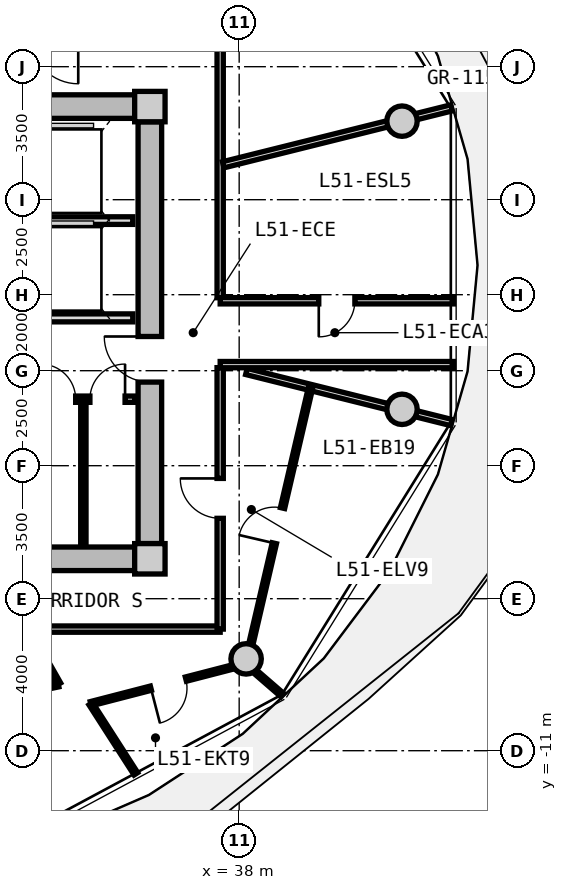
"""IFC4 building model, lengths in metres.
Left out: names, types, materials, properties, quantities, classifications, styles, units other than length and angle.
Written with IfcOpenShell. Run it as: python <this file> out.ifc"""

import sys

from ifc_helpers import new_model, si_unit, direction, frame, frame_2d, origin, origin_2d, place, context, subcontext, project, spatial, rectangle, circle, extrude, source, transform, mapped, element, fill, save


model = new_model("IFC4")
c1 = context("Model", 3, precision=1e-05, world=origin(), true_north=direction((0.0, 1.0)))
c2 = subcontext(c1, "Body", "Model", "MODEL_VIEW")
j1 = project(units=[si_unit("LENGTHUNIT", "METRE"), si_unit("PLANEANGLEUNIT", "RADIAN")], contexts=[c1])
p1 = place(None, origin())
s1 = spatial("IfcSite", under=j1, at=p1, CompositionType="ELEMENT")
p2 = place(p1, origin())
s2 = spatial("IfcBuilding", under=s1, at=p2, CompositionType="ELEMENT")
p3 = place(p2, frame((0.0, 0.0, 164.8)))
s3 = spatial("IfcBuildingStorey", under=s2, at=p3, CompositionType="ELEMENT", Elevation=164.8)
m1 = source(origin(), c2, "Body", "SweptSolid", [
    extrude(rectangle(XDim=0.8, YDim=0.8, at=origin_2d()), origin(), (0.0, 0.0, 1.0), 3.05),
])
for number, where, z_axis, x_axis in (
    (1, (35.65, -5.95, 0.0), (0.0, 0.0, 1.0), (1.0, 0.0, 0.0)),
    (2, (35.65, 5.95, 0.0), (0.0, 0.0, 1.0), (1.0, 0.0, 0.0)),
):
    element("IfcColumn", number, at=place(p3, frame(where, z_axis=z_axis, x_axis=x_axis)), inside=s3, PredefinedType="COLUMN", context=c2, shape_type="MappedRepresentation", body=[
        mapped(m1, transform((0.0, 0.0, 0.0), x_axis=(1.0, 0.0, 0.0), y_axis=(0.0, 1.0, 0.0), z_axis=(0.0, 0.0, 1.0), scale=1.0)),
    ])
m2 = source(origin(), c2, "Body", "SweptSolid", [
    extrude(rectangle(XDim=14.5, YDim=0.62, at=frame_2d((7.25, 0.0))), origin(), (0.0, 0.0, 1.0), 2.81),
])
for number, where, z_axis, x_axis in (
    (3, (20.75, 5.95, 0.0), (0.0, 0.0, 1.0), (1.0, 0.0, 0.0)),
    (4, (35.25, -5.95, 0.0), (0.0, 0.0, 1.0), (-1.0, 0.0, 0.0)),
):
    element("IfcWall", number, at=place(p3, frame(where, z_axis=z_axis, x_axis=x_axis)), inside=s3, PredefinedType="SHEAR", context=c2, shape_type="MappedRepresentation", body=[
        mapped(m2, transform((0.0, 0.0, 0.0), x_axis=(1.0, 0.0, 0.0), y_axis=(0.0, 1.0, 0.0), z_axis=(0.0, 0.0, 1.0), scale=1.0)),
    ])
m3 = source(origin(), c2, "Body", "SweptSolid", [
    extrude(rectangle(XDim=11.1, YDim=0.62, at=frame_2d((5.55, 0.0))), origin(), (0.0, 0.0, 1.0), 2.81),
])
p4 = place(p3, frame((35.65, 5.55, 0.0), z_axis=(0.0, 0.0, 1.0), x_axis=(0.0, -1.0, 0.0)))
e5 = element("IfcWall", 5, at=p4, inside=s3, PredefinedType="SHEAR", context=c2, shape_type="MappedRepresentation", body=[
    mapped(m3, transform((0.0, 0.0, 0.0), x_axis=(1.0, 0.0, 0.0), y_axis=(0.0, 1.0, 0.0), z_axis=(0.0, 0.0, 1.0), scale=1.0)),
])
p5 = place(p4, frame((5.65, 0.0, 0.0)))
e6 = element("IfcOpeningElement", 6, at=p5, cuts=e5, PredefinedType="OPENING", context=c2, shape_type="SweptSolid", body=[
    extrude(rectangle(XDim=1.2, YDim=2.15, at=frame_2d((0.6, 1.075))), frame((0.0, 0.32, 0.0), z_axis=(0.0, -1.0, 0.0), x_axis=(1.0, 0.0, 0.0)), (0.0, 0.0, 1.0), 0.64),
])
m4 = source(origin(), c2, "Body", "SweptSolid", [
    extrude(circle(Radius=0.4, at=origin_2d()), origin(), (0.0, 0.0, 1.0), 3.05),
])
for number, where, z_axis, x_axis in (
    (7, (42.285, 5.567, 0.0), (0.0, 0.0, 1.0), (1.0, 0.0, 0.0)),
    (8, (38.183, -8.584, 0.0), (0.0, 0.0, 1.0), (1.0, 0.0, 0.0)),
    (9, (42.285, -2.016, 0.0), (0.0, 0.0, 1.0), (1.0, 0.0, 0.0)),
):
    element("IfcColumn", number, at=place(p3, frame(where, z_axis=z_axis, x_axis=x_axis)), inside=s3, PredefinedType="COLUMN", context=c2, shape_type="MappedRepresentation", body=[
        mapped(m4, transform((0.0, 0.0, 0.0), x_axis=(1.0, 0.0, 0.0), y_axis=(0.0, 1.0, 0.0), z_axis=(0.0, 0.0, 1.0), scale=1.0)),
    ])
m5 = source(origin(), c2, "Body", "SweptSolid", [
    extrude(rectangle(XDim=3.2, YDim=0.2, at=frame_2d((1.6, 0.0))), origin(), (0.0, 0.0, 1.0), 2.795),
])
p6 = place(p3, frame((32.0, 2.95, 0.0), z_axis=(0.0, 0.0, 1.0), x_axis=(1.0, 0.0, 0.0)))
e10 = element("IfcWall", 10, at=p6, inside=s3, PredefinedType="PARTITIONING", context=c2, shape_type="MappedRepresentation", body=[
    mapped(m5, transform((0.0, 0.0, 0.0), x_axis=(1.0, 0.0, 0.0), y_axis=(0.0, 1.0, 0.0), z_axis=(0.0, 0.0, 1.0), scale=1.0)),
])
m6 = source(origin(), c2, "Body", "SweptSolid", [
    extrude(rectangle(XDim=6.66, YDim=0.21, at=frame_2d((3.33, 0.0))), origin(), (0.0, 0.0, 1.0), 2.795),
])
p7 = place(p3, frame((28.54, 0.39, 0.0), z_axis=(0.0, 0.0, 1.0), x_axis=(1.0, 0.0, 0.0)))
e11 = element("IfcWall", 11, at=p7, inside=s3, PredefinedType="PARTITIONING", context=c2, shape_type="MappedRepresentation", body=[
    mapped(m6, transform((0.0, 0.0, 0.0), x_axis=(1.0, 0.0, 0.0), y_axis=(0.0, 1.0, 0.0), z_axis=(0.0, 0.0, 1.0), scale=1.0)),
])
p8 = place(p7, frame((1.0, 0.0, 0.0)))
e12 = element("IfcOpeningElement", 12, at=p8, cuts=e11, PredefinedType="OPENING", context=c2, shape_type="SweptSolid", body=[
    extrude(rectangle(XDim=1.2, YDim=2.15, at=frame_2d((0.6, 1.075))), frame((0.0, 0.115, 0.0), z_axis=(0.0, -1.0, 0.0), x_axis=(1.0, 0.0, 0.0)), (0.0, 0.0, 1.0), 0.23),
])
m7 = source(origin(), c2, "Body", "SweptSolid", [
    extrude(rectangle(XDim=2.7, YDim=0.165, at=frame_2d((1.35, 0.0))), origin(), (0.0, 0.0, 1.0), 2.795),
])
p9 = place(p3, frame((32.55, -1.75, 0.0), z_axis=(0.0, 0.0, 1.0), x_axis=(1.0, 0.0, 0.0)))
e13 = element("IfcWall", 13, at=p9, inside=s3, PredefinedType="PARTITIONING", context=c2, shape_type="MappedRepresentation", body=[
    mapped(m7, transform((0.0, 0.0, 0.0), x_axis=(1.0, 0.0, 0.0), y_axis=(0.0, 1.0, 0.0), z_axis=(0.0, 0.0, 1.0), scale=1.0)),
])
p10 = place(p9, frame((0.222, 0.0, 0.0)))
e14 = element("IfcOpeningElement", 14, at=p10, cuts=e13, PredefinedType="OPENING", context=c2, shape_type="SweptSolid", body=[
    extrude(rectangle(XDim=0.925, YDim=2.1, at=frame_2d((0.462, 1.05))), frame((0.0, 0.093, 0.0), z_axis=(0.0, -1.0, 0.0), x_axis=(1.0, 0.0, 0.0)), (0.0, 0.0, 1.0), 0.185),
])
p11 = place(p9, frame((1.522, 0.0, 0.0)))
e15 = element("IfcOpeningElement", 15, at=p11, cuts=e13, PredefinedType="OPENING", context=c2, shape_type="SweptSolid", body=[
    extrude(rectangle(XDim=0.925, YDim=2.1, at=frame_2d((0.462, 1.05))), frame((0.0, 0.093, 0.0), z_axis=(0.0, -1.0, 0.0), x_axis=(1.0, 0.0, 0.0)), (0.0, 0.0, 1.0), 0.185),
])
m8 = source(origin(), c2, "Body", "SweptSolid", [
    extrude(rectangle(XDim=3.8, YDim=0.14, at=frame_2d((1.9, 0.0))), origin(), (0.0, 0.0, 1.0), 2.795),
])
p12 = place(p3, frame((33.9, -5.55, 0.0), z_axis=(0.0, 0.0, 1.0), x_axis=(0.0, 1.0, 0.0)))
e16 = element("IfcWall", 16, at=p12, inside=s3, PredefinedType="PARTITIONING", context=c2, shape_type="MappedRepresentation", body=[
    mapped(m8, transform((0.0, 0.0, 0.0), x_axis=(1.0, 0.0, 0.0), y_axis=(0.0, 1.0, 0.0), z_axis=(0.0, 0.0, 1.0), scale=1.0)),
])
m9 = source(origin(), c2, "Body", "SweptSolid", [
    extrude(rectangle(XDim=19.0, YDim=0.165, at=frame_2d((9.5, 0.0))), origin(), (0.0, 0.0, 1.0), 2.795),
])
p13 = place(p3, frame((37.5, -7.8, 0.0), z_axis=(0.0, 0.0, 1.0), x_axis=(-1.0, 0.0, 0.0)))
e17 = element("IfcWall", 17, at=p13, inside=s3, PredefinedType="PARTITIONING", context=c2, shape_type="MappedRepresentation", body=[
    mapped(m9, transform((0.0, 0.0, 0.0), x_axis=(1.0, 0.0, 0.0), y_axis=(0.0, 1.0, 0.0), z_axis=(0.0, 0.0, 1.0), scale=1.0)),
])
p14 = place(p13, frame((12.623, 0.0, 0.0)))
e18 = element("IfcOpeningElement", 18, at=p14, cuts=e17, PredefinedType="OPENING", context=c2, shape_type="SweptSolid", body=[
    extrude(rectangle(XDim=1.25, YDim=2.2, at=frame_2d((0.625, 1.1))), frame((0.0, 0.093, 0.0), z_axis=(0.0, -1.0, 0.0), x_axis=(1.0, 0.0, 0.0)), (0.0, 0.0, 1.0), 0.185),
])
m10 = source(origin(), c2, "Body", "SweptSolid", [
    extrude(rectangle(XDim=6.88, YDim=0.165, at=frame_2d((3.44, 0.0))), origin(), (0.0, 0.0, 1.0), 2.795),
])
p15 = place(p3, frame((37.5, 7.8, 0.0), z_axis=(0.0, 0.0, 1.0), x_axis=(0.0, -1.0, 0.0)))
e19 = element("IfcWall", 19, at=p15, inside=s3, PredefinedType="PARTITIONING", context=c2, shape_type="MappedRepresentation", body=[
    mapped(m10, transform((0.0, 0.0, 0.0), x_axis=(1.0, 0.0, 0.0), y_axis=(0.0, 1.0, 0.0), z_axis=(0.0, 0.0, 1.0), scale=1.0)),
])
p16 = place(p3, frame((37.5, -0.92, 0.0), z_axis=(0.0, 0.0, 1.0), x_axis=(0.0, -1.0, 0.0)))
e20 = element("IfcWall", 20, at=p16, inside=s3, PredefinedType="PARTITIONING", context=c2, shape_type="MappedRepresentation", body=[
    mapped(m10, transform((0.0, 0.0, 0.0), x_axis=(1.0, 0.0, 0.0), y_axis=(0.0, 1.0, 0.0), z_axis=(0.0, 0.0, 1.0), scale=1.0)),
])
p17 = place(p16, frame((2.915, 0.0, 0.0)))
e21 = element("IfcOpeningElement", 21, at=p17, cuts=e20, PredefinedType="OPENING", context=c2, shape_type="SweptSolid", body=[
    extrude(rectangle(XDim=1.05, YDim=2.15, at=frame_2d((0.525, 1.075))), frame((0.0, 0.093, 0.0), z_axis=(0.0, -1.0, 0.0), x_axis=(1.0, 0.0, 0.0)), (0.0, 0.0, 1.0), 0.185),
])
m11 = source(origin(), c2, "Body", "SweptSolid", [
    extrude(rectangle(XDim=5.564, YDim=0.165, at=frame_2d((2.782, 0.0))), origin(), (0.0, 0.0, 1.0), 2.345),
])
p18 = place(p3, frame((38.19, -1.02, 0.0), z_axis=(0.0, 0.0, 1.0), x_axis=(0.97031260977, -0.241854169533, 0.0)))
e22 = element("IfcWall", 22, at=p18, inside=s3, PredefinedType="PARTITIONING", context=c2, shape_type="MappedRepresentation", body=[
    mapped(m11, transform((0.0, 0.0, 0.0), x_axis=(1.0, 0.0, 0.0), y_axis=(0.0, 1.0, 0.0), z_axis=(0.0, 0.0, 1.0), scale=1.0)),
])
m12 = source(origin(), c2, "Body", "SweptSolid", [
    extrude(rectangle(XDim=6.193, YDim=0.165, at=frame_2d((3.096, 0.0))), origin(), (0.0, 0.0, 1.0), 2.345),
])
p19 = place(p3, frame((37.58, 4.419, 0.0), z_axis=(0.0, 0.0, 1.0), x_axis=(0.970309243466, 0.241867674657, 0.0)))
e23 = element("IfcWall", 23, at=p19, inside=s3, PredefinedType="PARTITIONING", context=c2, shape_type="MappedRepresentation", body=[
    mapped(m12, transform((0.0, 0.0, 0.0), x_axis=(1.0, 0.0, 0.0), y_axis=(0.0, 1.0, 0.0), z_axis=(0.0, 0.0, 1.0), scale=1.0)),
])
m13 = source(origin(), c2, "Body", "SweptSolid", [
    extrude(rectangle(XDim=6.139, YDim=0.165, at=frame_2d((3.069, 0.0))), origin(), (0.0, 0.0, 1.0), 2.795),
])
p20 = place(p3, frame((37.5, 0.84, 0.0), z_axis=(0.0, 0.0, 1.0), x_axis=(1.0, 0.0, 0.0)))
e24 = element("IfcWall", 24, at=p20, inside=s3, PredefinedType="PARTITIONING", context=c2, shape_type="MappedRepresentation", body=[
    mapped(m13, transform((0.0, 0.0, 0.0), x_axis=(1.0, 0.0, 0.0), y_axis=(0.0, 1.0, 0.0), z_axis=(0.0, 0.0, 1.0), scale=1.0)),
])
p21 = place(p20, frame((2.594, 0.0, 0.0)))
e25 = element("IfcOpeningElement", 25, at=p21, cuts=e24, PredefinedType="OPENING", context=c2, shape_type="SweptSolid", body=[
    extrude(rectangle(XDim=0.95, YDim=2.1, at=frame_2d((0.475, 1.05))), frame((0.0, 0.093, 0.0), z_axis=(0.0, -1.0, 0.0), x_axis=(1.0, 0.0, 0.0)), (0.0, 0.0, 1.0), 0.185),
])
p22 = place(p3, frame((43.639, -0.84, 0.0), z_axis=(0.0, 0.0, 1.0), x_axis=(-1.0, 0.0, 0.0)))
e26 = element("IfcWall", 26, at=p22, inside=s3, PredefinedType="PARTITIONING", context=c2, shape_type="MappedRepresentation", body=[
    mapped(m13, transform((0.0, 0.0, 0.0), x_axis=(1.0, 0.0, 0.0), y_axis=(0.0, 1.0, 0.0), z_axis=(0.0, 0.0, 1.0), scale=1.0)),
])
m14 = source(origin(), c2, "Body", "SweptSolid", [
    extrude(rectangle(XDim=7.469, YDim=0.115, at=frame_2d((3.734, 0.0))), origin(), (0.0, 0.0, 1.0), 2.795),
])
p23 = place(p3, frame((38.187, -8.715, 0.0), z_axis=(0.0, 0.0, 1.0), x_axis=(0.226790420763, 0.973943584121, 0.0)))
e27 = element("IfcWall", 27, at=p23, inside=s3, PredefinedType="PARTITIONING", context=c2, shape_type="MappedRepresentation", body=[
    mapped(m14, transform((0.0, 0.0, 0.0), x_axis=(1.0, 0.0, 0.0), y_axis=(0.0, 1.0, 0.0), z_axis=(0.0, 0.0, 1.0), scale=1.0)),
])
p24 = place(p23, frame((3.259, 0.0, 0.0)))
e28 = element("IfcOpeningElement", 28, at=p24, cuts=e27, PredefinedType="OPENING", context=c2, shape_type="SweptSolid", body=[
    extrude(rectangle(XDim=0.95, YDim=2.1, at=frame_2d((0.475, 1.05))), frame((0.0, 0.067, 0.0), z_axis=(0.0, -1.0, 0.0), x_axis=(1.0, 0.0, 0.0)), (0.0, 0.0, 1.0), 0.135),
])
m15 = source(origin(), c2, "Body", "SweptSolid", [
    extrude(rectangle(XDim=1.258, YDim=0.115, at=frame_2d((0.629, 0.0))), origin(), (0.0, 0.0, 1.0), 2.795),
])
p25 = place(p3, frame((38.187, -8.715, 0.0), z_axis=(0.0, 0.0, 1.0), x_axis=(0.755765923317, -0.654841865761, 0.0)))
e29 = element("IfcWall", 29, at=p25, inside=s3, PredefinedType="PARTITIONING", context=c2, shape_type="MappedRepresentation", body=[
    mapped(m15, transform((0.0, 0.0, 0.0), x_axis=(1.0, 0.0, 0.0), y_axis=(0.0, 1.0, 0.0), z_axis=(0.0, 0.0, 1.0), scale=1.0)),
])
m16 = source(origin(), c2, "Body", "SweptSolid", [
    extrude(rectangle(XDim=1.635, YDim=0.14, at=frame_2d((0.817, 0.0))), origin(), (0.0, 0.0, 1.0), 2.795),
])
p26 = place(p3, frame((32.434, -7.83, 0.0), z_axis=(0.0, 0.0, 1.0), x_axis=(0.494078690764, -0.869417188312, 0.0)))
e30 = element("IfcWall", 30, at=p26, inside=s3, PredefinedType="PARTITIONING", context=c2, shape_type="MappedRepresentation", body=[
    mapped(m16, transform((0.0, 0.0, 0.0), x_axis=(1.0, 0.0, 0.0), y_axis=(0.0, 1.0, 0.0), z_axis=(0.0, 0.0, 1.0), scale=1.0)),
])
m17 = source(origin(), c2, "Body", "SweptSolid", [
    extrude(rectangle(XDim=2.995, YDim=0.14, at=frame_2d((1.498, 0.0))), origin(), (0.0, 0.0, 1.0), 2.435),
])
p27 = place(p3, frame((33.241, -9.251, 0.0), z_axis=(0.0, 0.0, 1.0), x_axis=(-0.978075914325, -0.208248663425, 0.0)))
e31 = element("IfcWall", 31, at=p27, inside=s3, PredefinedType="PARTITIONING", context=c2, shape_type="MappedRepresentation", body=[
    mapped(m17, transform((0.0, 0.0, 0.0), x_axis=(1.0, 0.0, 0.0), y_axis=(0.0, 1.0, 0.0), z_axis=(0.0, 0.0, 1.0), scale=1.0)),
])
p28 = place(p27, frame((1.038, 0.0, 0.0)))
e32 = element("IfcOpeningElement", 32, at=p28, cuts=e31, PredefinedType="OPENING", context=c2, shape_type="SweptSolid", body=[
    extrude(rectangle(XDim=0.92, YDim=2.1, at=frame_2d((0.46, 1.05))), frame((0.0, 0.08, 0.0), z_axis=(0.0, -1.0, 0.0), x_axis=(1.0, 0.0, 0.0)), (0.0, 0.0, 1.0), 0.16),
])
m18 = source(origin(), c2, "Body", "SweptSolid", [
    extrude(rectangle(XDim=2.194, YDim=0.115, at=frame_2d((1.097, 0.0))), origin(), (0.0, 0.0, 1.0), 2.795),
])
p29 = place(p3, frame((34.095, -9.764, 0.0), z_axis=(0.0, 0.0, 1.0), x_axis=(0.540858831194, -0.841113383985, 0.0)))
e33 = element("IfcWall", 33, at=p29, inside=s3, PredefinedType="PARTITIONING", context=c2, shape_type="MappedRepresentation", body=[
    mapped(m18, transform((0.0, 0.0, 0.0), x_axis=(1.0, 0.0, 0.0), y_axis=(0.0, 1.0, 0.0), z_axis=(0.0, 0.0, 1.0), scale=1.0)),
])
m19 = source(origin(), c2, "Body", "SweptSolid", [
    extrude(rectangle(XDim=4.218, YDim=0.115, at=frame_2d((2.109, 0.0))), origin(), (0.0, 0.0, 1.0), 2.345),
])
p30 = place(p3, frame((34.095, -9.764, 0.0), z_axis=(0.0, 0.0, 1.0), x_axis=(0.968124892577, 0.250467946797, 0.0)))
e34 = element("IfcWall", 34, at=p30, inside=s3, PredefinedType="PARTITIONING", context=c2, shape_type="MappedRepresentation", body=[
    mapped(m19, transform((0.0, 0.0, 0.0), x_axis=(1.0, 0.0, 0.0), y_axis=(0.0, 1.0, 0.0), z_axis=(0.0, 0.0, 1.0), scale=1.0)),
])
p31 = place(p30, frame((1.634, 0.0, 0.0)))
e35 = element("IfcOpeningElement", 35, at=p31, cuts=e34, PredefinedType="OPENING", context=c2, shape_type="SweptSolid", body=[
    extrude(rectangle(XDim=0.95, YDim=2.1, at=frame_2d((0.475, 1.05))), frame((0.0, 0.067, 0.0), z_axis=(0.0, -1.0, 0.0), x_axis=(1.0, 0.0, 0.0)), (0.0, 0.0, 1.0), 0.135),
])
m20 = source(origin(), c2, "Body", "SweptSolid", [
    extrude(rectangle(XDim=1.2, YDim=2.15, at=frame_2d((0.6, 1.075))), frame((0.0, 0.025, 0.0), z_axis=(0.0, -1.0, 0.0), x_axis=(1.0, 0.0, 0.0)), (0.0, 0.0, 1.0), 0.05),
])
p32 = place(p5, frame((1.2, 0.0, 0.0), z_axis=(0.0, 0.0, 1.0), x_axis=(-1.0, 0.0, 0.0)))
e36 = element("IfcDoor", 36, at=p32, inside=s3, OperationType="SINGLE_SWING_RIGHT", PredefinedType="DOOR", context=c2, shape_type="MappedRepresentation", body=[
    mapped(m20, transform((0.0, 0.0, 0.0), x_axis=(1.0, 0.0, 0.0), y_axis=(0.0, 1.0, 0.0), z_axis=(0.0, 0.0, 1.0), scale=1.0)),
])
fill(e6, e36)
m21 = source(origin(), c2, "Body", "SweptSolid", [
    extrude(rectangle(XDim=0.925, YDim=2.1, at=frame_2d((0.462, 1.05))), frame((0.0, 0.025, 0.0), z_axis=(0.0, -1.0, 0.0), x_axis=(1.0, 0.0, 0.0)), (0.0, 0.0, 1.0), 0.05),
])
p33 = place(p10, origin())
e37 = element("IfcDoor", 37, at=p33, inside=s3, OperationType="SINGLE_SWING_LEFT", PredefinedType="DOOR", context=c2, shape_type="MappedRepresentation", body=[
    mapped(m21, transform((0.0, 0.0, 0.0), x_axis=(1.0, 0.0, 0.0), y_axis=(0.0, 1.0, 0.0), z_axis=(0.0, 0.0, 1.0), scale=1.0)),
])
fill(e14, e37)
p34 = place(p11, origin())
e38 = element("IfcDoor", 38, at=p34, inside=s3, OperationType="SINGLE_SWING_RIGHT", PredefinedType="DOOR", context=c2, shape_type="MappedRepresentation", body=[
    mapped(m21, transform((0.0, 0.0, 0.0), x_axis=(1.0, 0.0, 0.0), y_axis=(0.0, 1.0, 0.0), z_axis=(0.0, 0.0, 1.0), scale=1.0)),
])
fill(e15, e38)
m22 = source(origin(), c2, "Body", "SweptSolid", [
    extrude(rectangle(XDim=0.95, YDim=2.1, at=frame_2d((0.475, 1.05))), frame((0.0, 0.025, 0.0), z_axis=(0.0, -1.0, 0.0), x_axis=(1.0, 0.0, 0.0)), (0.0, 0.0, 1.0), 0.05),
])
p35 = place(p21, frame((0.95, 0.0, 0.0), z_axis=(0.0, 0.0, 1.0), x_axis=(-1.0, 0.0, 0.0)))
e39 = element("IfcDoor", 39, at=p35, inside=s3, OperationType="SINGLE_SWING_RIGHT", PredefinedType="DOOR", context=c2, shape_type="MappedRepresentation", body=[
    mapped(m22, transform((0.0, 0.0, 0.0), x_axis=(1.0, 0.0, 0.0), y_axis=(0.0, 1.0, 0.0), z_axis=(0.0, 0.0, 1.0), scale=1.0)),
])
fill(e25, e39)
m23 = source(origin(), c2, "Body", "SweptSolid", [
    extrude(rectangle(XDim=1.05, YDim=2.15, at=frame_2d((0.525, 1.075))), frame((0.0, 0.025, 0.0), z_axis=(0.0, -1.0, 0.0), x_axis=(1.0, 0.0, 0.0)), (0.0, 0.0, 1.0), 0.05),
])
p36 = place(p17, frame((1.05, 0.0, 0.0), z_axis=(0.0, 0.0, 1.0), x_axis=(-1.0, 0.0, 0.0)))
e40 = element("IfcDoor", 40, at=p36, inside=s3, OperationType="SINGLE_SWING_RIGHT", PredefinedType="DOOR", context=c2, shape_type="MappedRepresentation", body=[
    mapped(m23, transform((0.0, 0.0, 0.0), x_axis=(1.0, 0.0, 0.0), y_axis=(0.0, 1.0, 0.0), z_axis=(0.0, 0.0, 1.0), scale=1.0)),
])
fill(e21, e40)
p37 = place(p31, frame((0.95, 0.0, 0.0), z_axis=(0.0, 0.0, 1.0), x_axis=(-1.0, 0.0, 0.0)))
e41 = element("IfcDoor", 41, at=p37, inside=s3, OperationType="SINGLE_SWING_RIGHT", PredefinedType="DOOR", context=c2, shape_type="MappedRepresentation", body=[
    mapped(m22, transform((0.0, 0.0, 0.0), x_axis=(1.0, 0.0, 0.0), y_axis=(0.0, 1.0, 0.0), z_axis=(0.0, 0.0, 1.0), scale=1.0)),
])
fill(e35, e41)
p38 = place(p24, origin())
e42 = element("IfcDoor", 42, at=p38, inside=s3, OperationType="SINGLE_SWING_LEFT", PredefinedType="DOOR", context=c2, shape_type="MappedRepresentation", body=[
    mapped(m22, transform((0.0, 0.0, 0.0), x_axis=(1.0, 0.0, 0.0), y_axis=(0.0, 1.0, 0.0), z_axis=(0.0, 0.0, 1.0), scale=1.0)),
])
fill(e28, e42)
save(model, sys.argv[1])
